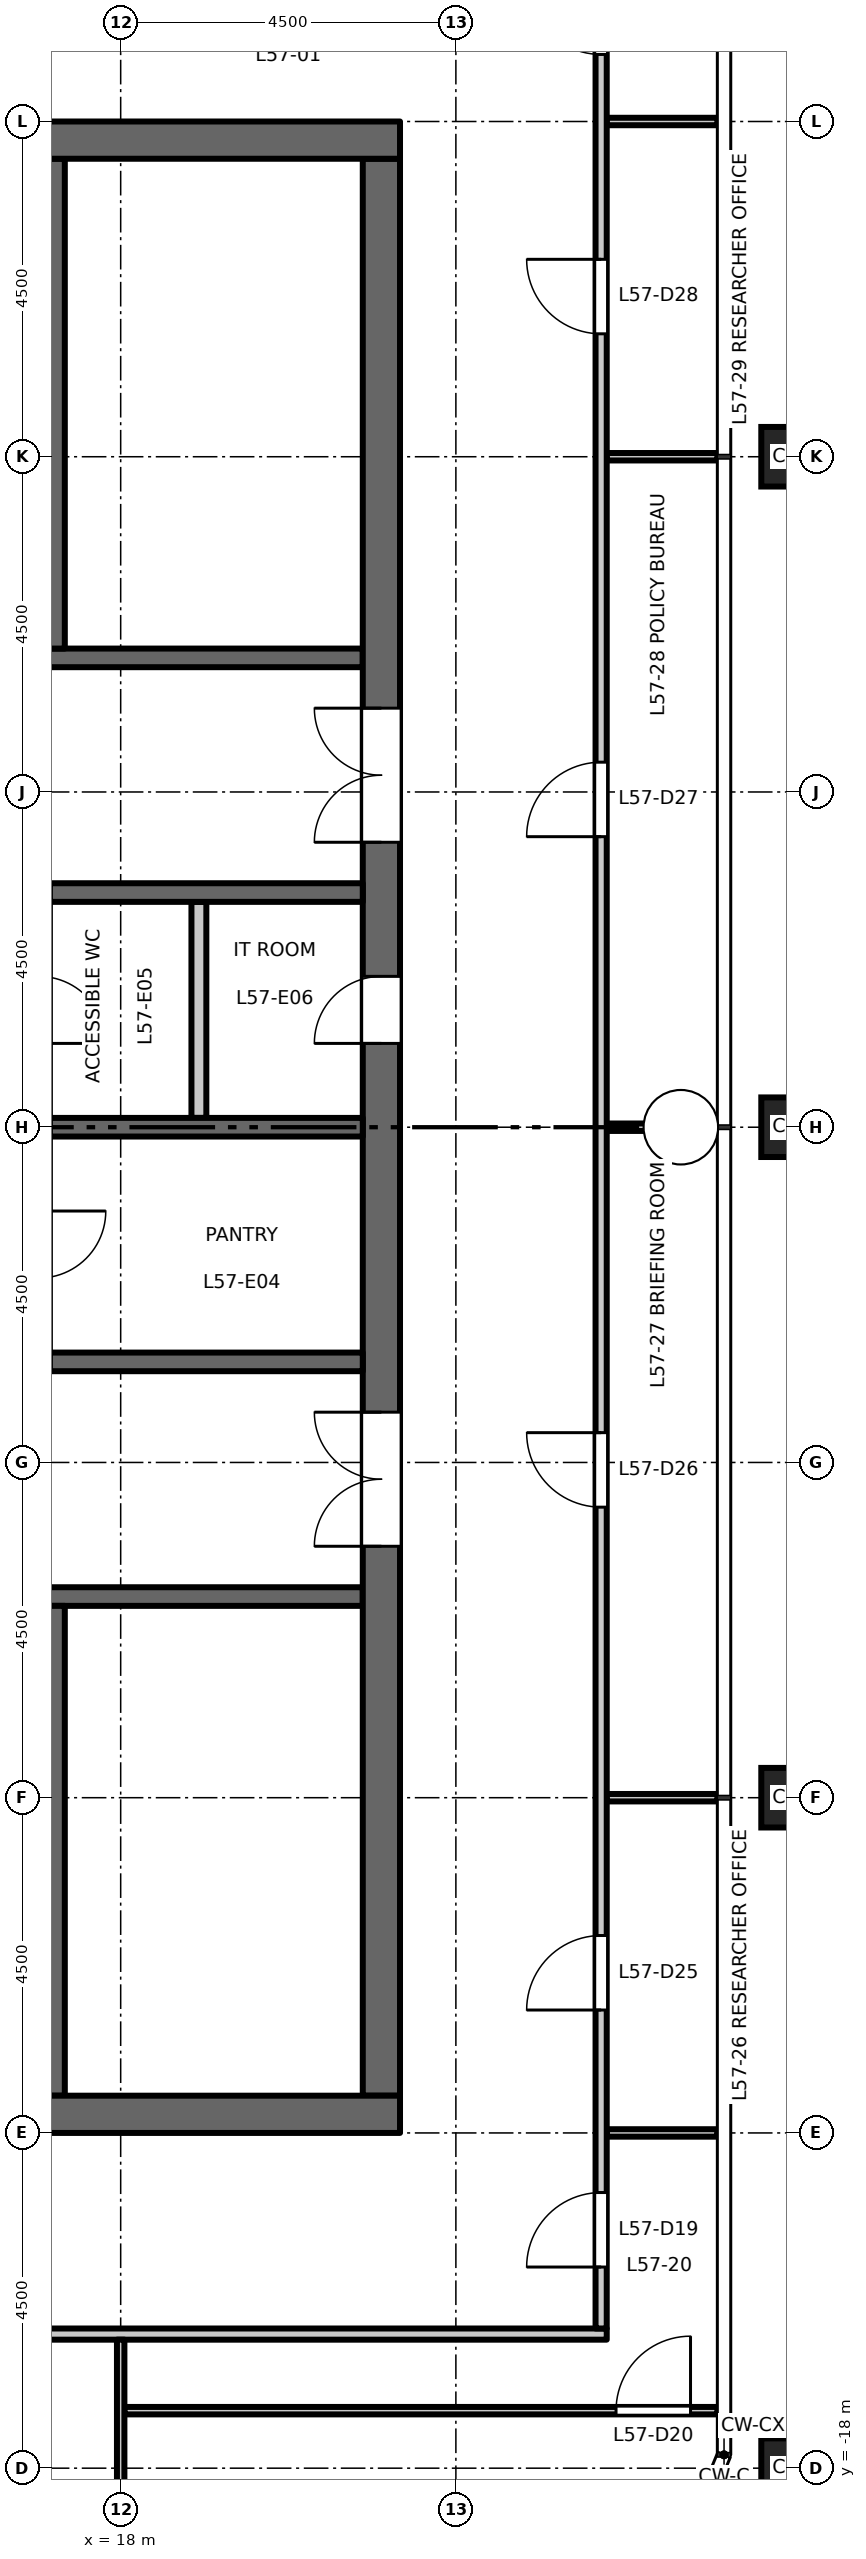
"""IFC4 building model, lengths in metres.
Left out: names, types, materials, properties, quantities, classifications, styles, units other than length and angle.
Written with IfcOpenShell. Run it as: python <this file> out.ifc"""

import sys

from ifc_helpers import new_model, si_unit, direction, frame, frame_2d, origin, origin_2d, place, context, subcontext, project, spatial, rectangle, hollow_rectangle, extrude, element, fill, save


model = new_model("IFC4")
c1 = context("Model", 3, precision=1e-05, world=origin(), true_north=direction((0.0, 1.0)))
c2 = subcontext(c1, "Body", "Model", "MODEL_VIEW")
j1 = project(units=[si_unit("LENGTHUNIT", "METRE"), si_unit("PLANEANGLEUNIT", "RADIAN")], contexts=[c1])
p1 = place(None, origin())
s1 = spatial("IfcSite", under=j1, at=p1, CompositionType="ELEMENT")
p2 = place(p1, origin())
s2 = spatial("IfcBuilding", under=s1, at=p2, CompositionType="ELEMENT")
p3 = place(p2, frame((0.0, 0.0, 264.7)))
s3 = spatial("IfcBuildingStorey", under=s2, at=p3, CompositionType="ELEMENT", Elevation=264.7)
for number, where, z_axis, x_axis in (
    (1, (27.0, -18.0, 0.0), (0.0, 0.0, 1.0), (1.0, 0.0, 0.0)),
    (2, (27.0, -9.0, 0.0), (0.0, 0.0, 1.0), (1.0, 0.0, 0.0)),
    (3, (27.0, 0.0, 0.0), (0.0, 0.0, 1.0), (1.0, 0.0, 0.0)),
    (4, (27.0, 9.0, 0.0), (0.0, 0.0, 1.0), (1.0, 0.0, 0.0)),
):
    element("IfcColumn", number, at=place(p3, frame(where, z_axis=z_axis, x_axis=x_axis)), inside=s3, PredefinedType="COLUMN", context=c2, shape_type="SweptSolid", body=[
        extrude(hollow_rectangle(XDim=0.8, YDim=0.8, WallThickness=0.045, at=origin_2d()), origin(), (0.0, 0.0, 1.0), 4.5),
    ])
p4 = place(p3, frame((17.0, 6.3, 0.0), z_axis=(0.0, 0.0, 1.0), x_axis=(1.0, 0.0, 0.0)))
e5 = element("IfcWall", 5, at=p4, inside=s3, PredefinedType="SHEAR", context=c2, shape_type="SweptSolid", body=[
    extrude(rectangle(XDim=4.25, YDim=0.25, at=frame_2d((2.125, 0.0))), origin(), (0.0, 0.0, 1.0), 4.35),
])
p5 = place(p3, frame((12.15, -6.3, 0.0), z_axis=(0.0, 0.0, 1.0), x_axis=(1.0, 0.0, 0.0)))
e6 = element("IfcWall", 6, at=p5, inside=s3, PredefinedType="SHEAR", context=c2, shape_type="SweptSolid", body=[
    extrude(rectangle(XDim=9.1, YDim=0.25, at=frame_2d((4.55, 0.0))), origin(), (0.0, 0.0, 1.0), 4.35),
])
p6 = place(p5, frame((1.8, 0.0, 0.0)))
e7 = element("IfcOpeningElement", 7, at=p6, cuts=e6, PredefinedType="OPENING", context=c2, shape_type="SweptSolid", body=[
    extrude(rectangle(XDim=1.0, YDim=2.1, at=frame_2d((0.5, 1.05))), frame((0.0, 0.135, 0.0), z_axis=(0.0, -1.0, 0.0), x_axis=(1.0, 0.0, 0.0)), (0.0, 0.0, 1.0), 0.27),
])
p7 = place(p3, frame((21.5, -13.0, 0.0), z_axis=(0.0, 0.0, 1.0), x_axis=(0.0, 1.0, 0.0)))
e8 = element("IfcWall", 8, at=p7, inside=s3, PredefinedType="SHEAR", context=c2, shape_type="SweptSolid", body=[
    extrude(rectangle(XDim=26.0, YDim=0.5, at=frame_2d((13.0, 0.0))), origin(), (0.0, 0.0, 1.0), 4.35),
])
p8 = place(p7, frame((16.825, 0.0, 0.0)))
e9 = element("IfcOpeningElement", 9, at=p8, cuts=e8, PredefinedType="OPENING", context=c2, shape_type="SweptSolid", body=[
    extrude(rectangle(XDim=1.8, YDim=2.1, at=frame_2d((0.9, 1.05))), frame((0.0, 0.26, 0.0), z_axis=(0.0, -1.0, 0.0), x_axis=(1.0, 0.0, 0.0)), (0.0, 0.0, 1.0), 0.52),
])
p9 = place(p7, frame((7.375, 0.0, 0.0)))
e10 = element("IfcOpeningElement", 10, at=p9, cuts=e8, PredefinedType="OPENING", context=c2, shape_type="SweptSolid", body=[
    extrude(rectangle(XDim=1.8, YDim=2.1, at=frame_2d((0.9, 1.05))), frame((0.0, 0.26, 0.0), z_axis=(0.0, -1.0, 0.0), x_axis=(1.0, 0.0, 0.0)), (0.0, 0.0, 1.0), 0.52),
])
p10 = place(p7, frame((14.125, 0.0, 0.0)))
e11 = element("IfcOpeningElement", 11, at=p10, cuts=e8, PredefinedType="OPENING", context=c2, shape_type="SweptSolid", body=[
    extrude(rectangle(XDim=0.9, YDim=2.1, at=frame_2d((0.45, 1.05))), frame((0.0, 0.26, 0.0), z_axis=(0.0, -1.0, 0.0), x_axis=(1.0, 0.0, 0.0)), (0.0, 0.0, 1.0), 0.52),
])
for number, where, z_axis, x_axis in (
    (12, (17.05, 0.0, 0.0), (0.0, 0.0, 1.0), (1.0, 0.0, 0.0)),
    (13, (17.05, 3.15, 0.0), (0.0, 0.0, 1.0), (1.0, 0.0, 0.0)),
    (14, (17.05, -3.15, 0.0), (0.0, 0.0, 1.0), (1.0, 0.0, 0.0)),
):
    element("IfcWall", number, at=place(p3, frame(where, z_axis=z_axis, x_axis=x_axis)), inside=s3, PredefinedType="SHEAR", context=c2, shape_type="SweptSolid", body=[
        extrude(rectangle(XDim=4.2, YDim=0.25, at=frame_2d((2.1, 0.0))), origin(), (0.0, 0.0, 1.0), 4.35),
    ])
p11 = place(p3, frame((19.05, 0.125, 0.0), z_axis=(0.0, 0.0, 1.0), x_axis=(0.0, 1.0, 0.0)))
e15 = element("IfcWall", 15, at=p11, inside=s3, PredefinedType="PARTITIONING", context=c2, shape_type="SweptSolid", body=[
    extrude(rectangle(XDim=2.9, YDim=0.2, at=frame_2d((1.45, 0.0))), origin(), (0.0, 0.0, 1.0), 4.35),
])
for number, where, z_axis, x_axis in (
    (16, (17.0, 6.425, 0.0), (0.0, 0.0, 1.0), (0.0, 1.0, 0.0)),
    (17, (17.0, -13.0, 0.0), (0.0, 0.0, 1.0), (0.0, 1.0, 0.0)),
):
    element("IfcWall", number, at=place(p3, frame(where, z_axis=z_axis, x_axis=x_axis)), inside=s3, PredefinedType="SHEAR", context=c2, shape_type="SweptSolid", body=[
        extrude(rectangle(XDim=6.575, YDim=0.5, at=frame_2d((3.288, 0.0))), origin(), (0.0, 0.0, 1.0), 4.35),
    ])
for number, where, z_axis, x_axis in (
    (18, (8.25, 13.25, 0.0), (0.0, 0.0, 1.0), (1.0, 0.0, 0.0)),
    (19, (8.25, -13.25, 0.0), (0.0, 0.0, 1.0), (1.0, 0.0, 0.0)),
):
    element("IfcWall", number, at=place(p3, frame(where, z_axis=z_axis, x_axis=x_axis)), inside=s3, PredefinedType="SHEAR", context=c2, shape_type="SweptSolid", body=[
        extrude(rectangle(XDim=13.5, YDim=0.5, at=frame_2d((6.75, 0.0))), origin(), (0.0, 0.0, 1.0), 4.35),
    ])
p12 = place(p3, frame((18.05, -17.228, 0.0), z_axis=(0.0, 0.0, 1.0), x_axis=(1.0, 0.0, 0.0)))
e20 = element("IfcWall", 20, at=p12, inside=s3, PredefinedType="PARTITIONING", context=c2, shape_type="SweptSolid", body=[
    extrude(rectangle(XDim=7.96, YDim=0.1, at=frame_2d((3.98, 0.0))), origin(), (0.0, 0.0, 1.0), 4.35),
])
p13 = place(p12, frame((6.6, 0.0, 0.0)))
e21 = element("IfcOpeningElement", 21, at=p13, cuts=e20, PredefinedType="OPENING", context=c2, shape_type="SweptSolid", body=[
    extrude(rectangle(XDim=1.0, YDim=2.1, at=frame_2d((0.5, 1.05))), frame((0.0, 0.06, 0.0), z_axis=(0.0, -1.0, 0.0), x_axis=(1.0, 0.0, 0.0)), (0.0, 0.0, 1.0), 0.12),
])
p14 = place(p3, frame((-24.525, -16.2, 0.0), z_axis=(0.0, 0.0, 1.0), x_axis=(1.0, 0.0, 0.0)))
e22 = element("IfcWall", 22, at=p14, inside=s3, PredefinedType="PARTITIONING", context=c2, shape_type="SweptSolid", body=[
    extrude(rectangle(XDim=49.05, YDim=0.15, at=frame_2d((24.525, 0.0))), origin(), (0.0, 0.0, 1.0), 4.35),
])
p15 = place(p14, frame((10.425, 0.0, 0.0)))
e23 = element("IfcOpeningElement", 23, at=p15, cuts=e22, PredefinedType="OPENING", context=c2, shape_type="SweptSolid", body=[
    extrude(rectangle(XDim=1.0, YDim=2.1, at=frame_2d((0.5, 1.05))), frame((0.0, 0.085, 0.0), z_axis=(0.0, -1.0, 0.0), x_axis=(1.0, 0.0, 0.0)), (0.0, 0.0, 1.0), 0.17),
])
p16 = place(p14, frame((19.425, 0.0, 0.0)))
e24 = element("IfcOpeningElement", 24, at=p16, cuts=e22, PredefinedType="OPENING", context=c2, shape_type="SweptSolid", body=[
    extrude(rectangle(XDim=1.0, YDim=2.1, at=frame_2d((0.5, 1.05))), frame((0.0, 0.085, 0.0), z_axis=(0.0, -1.0, 0.0), x_axis=(1.0, 0.0, 0.0)), (0.0, 0.0, 1.0), 0.17),
])
p17 = place(p14, frame((28.425, 0.0, 0.0)))
e25 = element("IfcOpeningElement", 25, at=p17, cuts=e22, PredefinedType="OPENING", context=c2, shape_type="SweptSolid", body=[
    extrude(rectangle(XDim=1.0, YDim=2.1, at=frame_2d((0.5, 1.05))), frame((0.0, 0.085, 0.0), z_axis=(0.0, -1.0, 0.0), x_axis=(1.0, 0.0, 0.0)), (0.0, 0.0, 1.0), 0.17),
])
p18 = place(p14, frame((35.175, 0.0, 0.0)))
e26 = element("IfcOpeningElement", 26, at=p18, cuts=e22, PredefinedType="OPENING", context=c2, shape_type="SweptSolid", body=[
    extrude(rectangle(XDim=1.0, YDim=2.1, at=frame_2d((0.5, 1.05))), frame((0.0, 0.085, 0.0), z_axis=(0.0, -1.0, 0.0), x_axis=(1.0, 0.0, 0.0)), (0.0, 0.0, 1.0), 0.17),
])
p19 = place(p14, frame((39.675, 0.0, 0.0)))
e27 = element("IfcOpeningElement", 27, at=p19, cuts=e22, PredefinedType="OPENING", context=c2, shape_type="SweptSolid", body=[
    extrude(rectangle(XDim=1.0, YDim=2.1, at=frame_2d((0.5, 1.05))), frame((0.0, 0.085, 0.0), z_axis=(0.0, -1.0, 0.0), x_axis=(1.0, 0.0, 0.0)), (0.0, 0.0, 1.0), 0.17),
])
p20 = place(p14, frame((2.725, 0.0, 0.0)))
e28 = element("IfcOpeningElement", 28, at=p20, cuts=e22, PredefinedType="OPENING", context=c2, shape_type="SweptSolid", body=[
    extrude(rectangle(XDim=1.0, YDim=2.1, at=frame_2d((0.5, 1.05))), frame((0.0, 0.085, 0.0), z_axis=(0.0, -1.0, 0.0), x_axis=(1.0, 0.0, 0.0)), (0.0, 0.0, 1.0), 0.17),
])
p21 = place(p3, frame((24.525, -13.5, 0.0), z_axis=(0.0, 0.0, 1.0), x_axis=(1.0, 0.0, 0.0)))
e29 = element("IfcWall", 29, at=p21, inside=s3, PredefinedType="PARTITIONING", context=c2, shape_type="SweptSolid", body=[
    extrude(rectangle(XDim=1.485, YDim=0.1, at=frame_2d((0.743, 0.0))), origin(), (0.0, 0.0, 1.0), 3.95),
])
for number, where, z_axis, x_axis in (
    (30, (24.525, -9.0, 0.0), (0.0, 0.0, 1.0), (1.0, 0.0, 0.0)),
    (31, (24.525, 0.0, 0.0), (0.0, 0.0, 1.0), (1.0, 0.0, 0.0)),
    (32, (24.525, 9.0, 0.0), (0.0, 0.0, 1.0), (1.0, 0.0, 0.0)),
    (33, (24.525, 13.5, 0.0), (0.0, 0.0, 1.0), (1.0, 0.0, 0.0)),
):
    element("IfcWall", number, at=place(p3, frame(where, z_axis=z_axis, x_axis=x_axis)), inside=s3, PredefinedType="PARTITIONING", context=c2, shape_type="SweptSolid", body=[
        extrude(rectangle(XDim=1.485, YDim=0.1, at=frame_2d((0.743, 0.0))), origin(), (0.0, 0.0, 1.0), 4.35),
    ])
p22 = place(p3, frame((18.0, -25.928, 0.0), z_axis=(0.0, 0.0, 1.0), x_axis=(0.0, 1.0, 0.0)))
e34 = element("IfcWall", 34, at=p22, inside=s3, PredefinedType="PARTITIONING", context=c2, shape_type="SweptSolid", body=[
    extrude(rectangle(XDim=9.653, YDim=0.1, at=frame_2d((4.827, 0.0))), origin(), (0.0, 0.0, 1.0), 3.65),
])
p23 = place(p3, frame((24.45, -16.125, 0.0), z_axis=(0.0, 0.0, 1.0), x_axis=(0.0, 1.0, 0.0)))
e35 = element("IfcWall", 35, at=p23, inside=s3, PredefinedType="PARTITIONING", context=c2, shape_type="SweptSolid", body=[
    extrude(rectangle(XDim=32.25, YDim=0.15, at=frame_2d((16.125, 0.0))), origin(), (0.0, 0.0, 1.0), 4.35),
])
p24 = place(p23, frame((30.525, 0.0, 0.0)))
e36 = element("IfcOpeningElement", 36, at=p24, cuts=e35, PredefinedType="OPENING", context=c2, shape_type="SweptSolid", body=[
    extrude(rectangle(XDim=1.0, YDim=2.1, at=frame_2d((0.5, 1.05))), frame((0.0, 0.085, 0.0), z_axis=(0.0, -1.0, 0.0), x_axis=(1.0, 0.0, 0.0)), (0.0, 0.0, 1.0), 0.17),
])
p25 = place(p23, frame((0.825, 0.0, 0.0)))
e37 = element("IfcOpeningElement", 37, at=p25, cuts=e35, PredefinedType="OPENING", context=c2, shape_type="SweptSolid", body=[
    extrude(rectangle(XDim=1.0, YDim=2.1, at=frame_2d((0.5, 1.05))), frame((0.0, 0.085, 0.0), z_axis=(0.0, -1.0, 0.0), x_axis=(1.0, 0.0, 0.0)), (0.0, 0.0, 1.0), 0.17),
])
p26 = place(p23, frame((4.275, 0.0, 0.0)))
e38 = element("IfcOpeningElement", 38, at=p26, cuts=e35, PredefinedType="OPENING", context=c2, shape_type="SweptSolid", body=[
    extrude(rectangle(XDim=1.0, YDim=2.1, at=frame_2d((0.5, 1.05))), frame((0.0, 0.085, 0.0), z_axis=(0.0, -1.0, 0.0), x_axis=(1.0, 0.0, 0.0)), (0.0, 0.0, 1.0), 0.17),
])
p27 = place(p23, frame((11.025, 0.0, 0.0)))
e39 = element("IfcOpeningElement", 39, at=p27, cuts=e35, PredefinedType="OPENING", context=c2, shape_type="SweptSolid", body=[
    extrude(rectangle(XDim=1.0, YDim=2.1, at=frame_2d((0.5, 1.05))), frame((0.0, 0.085, 0.0), z_axis=(0.0, -1.0, 0.0), x_axis=(1.0, 0.0, 0.0)), (0.0, 0.0, 1.0), 0.17),
])
p28 = place(p23, frame((20.025, 0.0, 0.0)))
e40 = element("IfcOpeningElement", 40, at=p28, cuts=e35, PredefinedType="OPENING", context=c2, shape_type="SweptSolid", body=[
    extrude(rectangle(XDim=1.0, YDim=2.1, at=frame_2d((0.5, 1.05))), frame((0.0, 0.085, 0.0), z_axis=(0.0, -1.0, 0.0), x_axis=(1.0, 0.0, 0.0)), (0.0, 0.0, 1.0), 0.17),
])
p29 = place(p23, frame((26.775, 0.0, 0.0)))
e41 = element("IfcOpeningElement", 41, at=p29, cuts=e35, PredefinedType="OPENING", context=c2, shape_type="SweptSolid", body=[
    extrude(rectangle(XDim=1.0, YDim=2.1, at=frame_2d((0.5, 1.05))), frame((0.0, 0.085, 0.0), z_axis=(0.0, -1.0, 0.0), x_axis=(1.0, 0.0, 0.0)), (0.0, 0.0, 1.0), 0.17),
])
p30 = place(p8, origin())
e42 = element("IfcDoor", 42, at=p30, inside=s3, OperationType="DOUBLE_DOOR_DOUBLE_SWING", PredefinedType="DOOR", context=c2, shape_type="SweptSolid", body=[
    extrude(rectangle(XDim=1.8, YDim=2.1, at=frame_2d((0.9, 1.05))), frame((0.0, 0.025, 0.0), z_axis=(0.0, -1.0, 0.0), x_axis=(1.0, 0.0, 0.0)), (0.0, 0.0, 1.0), 0.05),
])
fill(e9, e42)
p31 = place(p9, origin())
e43 = element("IfcDoor", 43, at=p31, inside=s3, OperationType="DOUBLE_DOOR_DOUBLE_SWING", PredefinedType="DOOR", context=c2, shape_type="SweptSolid", body=[
    extrude(rectangle(XDim=1.8, YDim=2.1, at=frame_2d((0.9, 1.05))), frame((0.0, 0.025, 0.0), z_axis=(0.0, -1.0, 0.0), x_axis=(1.0, 0.0, 0.0)), (0.0, 0.0, 1.0), 0.05),
])
fill(e10, e43)
p32 = place(p10, origin())
e44 = element("IfcDoor", 44, at=p32, inside=s3, OperationType="SINGLE_SWING_RIGHT", PredefinedType="DOOR", context=c2, shape_type="SweptSolid", body=[
    extrude(rectangle(XDim=0.9, YDim=2.1, at=frame_2d((0.45, 1.05))), frame((0.0, 0.025, 0.0), z_axis=(0.0, -1.0, 0.0), x_axis=(1.0, 0.0, 0.0)), (0.0, 0.0, 1.0), 0.05),
])
fill(e11, e44)
p33 = place(p24, origin())
e45 = element("IfcDoor", 45, at=p33, inside=s3, OperationType="SINGLE_SWING_RIGHT", PredefinedType="DOOR", context=c2, shape_type="SweptSolid", body=[
    extrude(rectangle(XDim=1.0, YDim=2.1, at=frame_2d((0.5, 1.05))), frame((0.0, 0.025, 0.0), z_axis=(0.0, -1.0, 0.0), x_axis=(1.0, 0.0, 0.0)), (0.0, 0.0, 1.0), 0.05),
])
fill(e36, e45)
p34 = place(p25, origin())
e46 = element("IfcDoor", 46, at=p34, inside=s3, OperationType="SINGLE_SWING_LEFT", PredefinedType="DOOR", context=c2, shape_type="SweptSolid", body=[
    extrude(rectangle(XDim=1.0, YDim=2.1, at=frame_2d((0.5, 1.05))), frame((0.0, 0.025, 0.0), z_axis=(0.0, -1.0, 0.0), x_axis=(1.0, 0.0, 0.0)), (0.0, 0.0, 1.0), 0.05),
])
fill(e37, e46)
p35 = place(p13, origin())
e47 = element("IfcDoor", 47, at=p35, inside=s3, OperationType="SINGLE_SWING_RIGHT", PredefinedType="DOOR", context=c2, shape_type="SweptSolid", body=[
    extrude(rectangle(XDim=1.0, YDim=2.1, at=frame_2d((0.5, 1.05))), frame((0.0, 0.025, 0.0), z_axis=(0.0, -1.0, 0.0), x_axis=(1.0, 0.0, 0.0)), (0.0, 0.0, 1.0), 0.05),
])
fill(e21, e47)
p36 = place(p26, origin())
e48 = element("IfcDoor", 48, at=p36, inside=s3, OperationType="SINGLE_SWING_LEFT", PredefinedType="DOOR", context=c2, shape_type="SweptSolid", body=[
    extrude(rectangle(XDim=1.0, YDim=2.1, at=frame_2d((0.5, 1.05))), frame((0.0, 0.025, 0.0), z_axis=(0.0, -1.0, 0.0), x_axis=(1.0, 0.0, 0.0)), (0.0, 0.0, 1.0), 0.05),
])
fill(e38, e48)
p37 = place(p27, origin())
e49 = element("IfcDoor", 49, at=p37, inside=s3, OperationType="SINGLE_SWING_RIGHT", PredefinedType="DOOR", context=c2, shape_type="SweptSolid", body=[
    extrude(rectangle(XDim=1.0, YDim=2.1, at=frame_2d((0.5, 1.05))), frame((0.0, 0.025, 0.0), z_axis=(0.0, -1.0, 0.0), x_axis=(1.0, 0.0, 0.0)), (0.0, 0.0, 1.0), 0.05),
])
fill(e39, e49)
p38 = place(p28, origin())
e50 = element("IfcDoor", 50, at=p38, inside=s3, OperationType="SINGLE_SWING_LEFT", PredefinedType="DOOR", context=c2, shape_type="SweptSolid", body=[
    extrude(rectangle(XDim=1.0, YDim=2.1, at=frame_2d((0.5, 1.05))), frame((0.0, 0.025, 0.0), z_axis=(0.0, -1.0, 0.0), x_axis=(1.0, 0.0, 0.0)), (0.0, 0.0, 1.0), 0.05),
])
fill(e40, e50)
p39 = place(p29, origin())
e51 = element("IfcDoor", 51, at=p39, inside=s3, OperationType="SINGLE_SWING_RIGHT", PredefinedType="DOOR", context=c2, shape_type="SweptSolid", body=[
    extrude(rectangle(XDim=1.0, YDim=2.1, at=frame_2d((0.5, 1.05))), frame((0.0, 0.025, 0.0), z_axis=(0.0, -1.0, 0.0), x_axis=(1.0, 0.0, 0.0)), (0.0, 0.0, 1.0), 0.05),
])
fill(e41, e51)
save(model, sys.argv[1])
